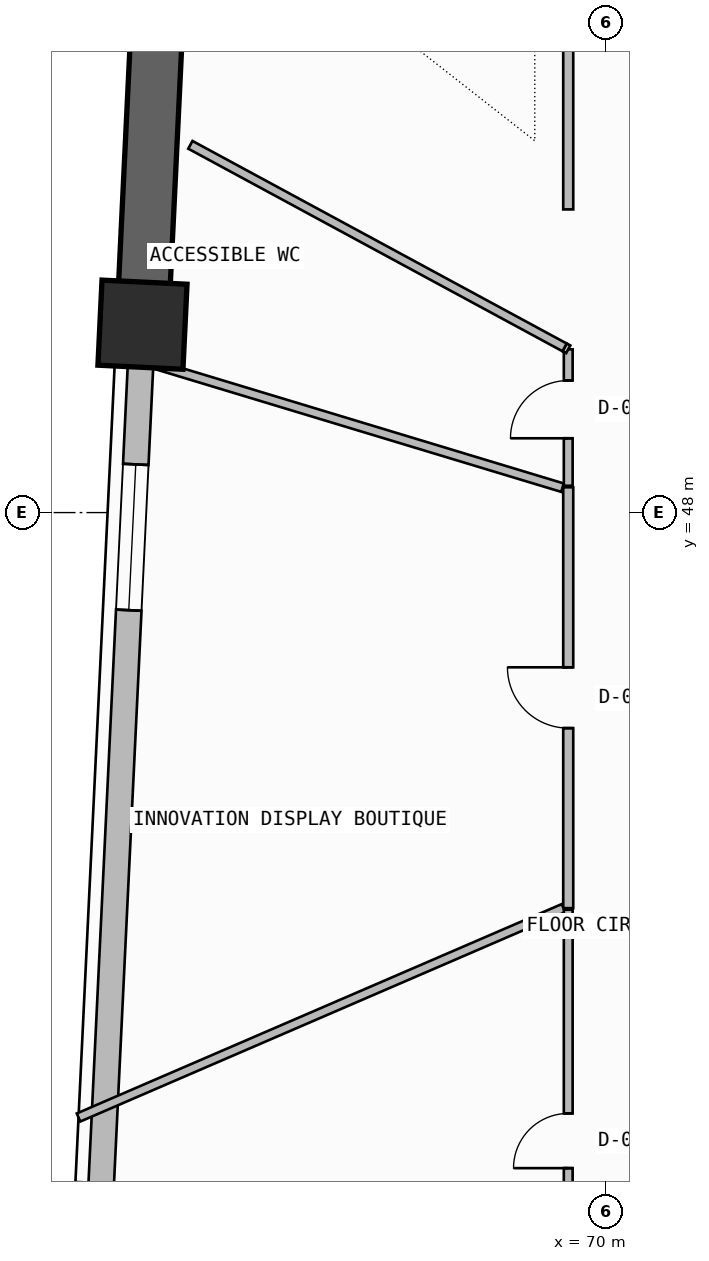
"""IFC4 building model, lengths in metres.
Left out: names, types, materials, properties, quantities, classifications, styles, units other than length and angle.
Written with IfcOpenShell. Run it as: python <this file> out.ifc"""

import sys

from ifc_helpers import new_model, si_unit, direction, frame, frame_2d, origin, origin_2d, place, context, subcontext, project, spatial, rectangle, extrude, element, fill, save


model = new_model("IFC4")
c1 = context("Model", 3, precision=1e-05, world=origin(), true_north=direction((0.0, 1.0)))
c2 = subcontext(c1, "Body", "Model", "MODEL_VIEW")
j1 = project(units=[si_unit("LENGTHUNIT", "METRE"), si_unit("PLANEANGLEUNIT", "RADIAN")], contexts=[c1])
p1 = place(None, origin())
s1 = spatial("IfcSite", under=j1, at=p1, CompositionType="ELEMENT")
p2 = place(p1, origin())
s2 = spatial("IfcBuilding", under=s1, at=p2, CompositionType="ELEMENT")
p3 = place(p2, frame((0.0, 0.0, 41.1)))
s3 = spatial("IfcBuildingStorey", under=s2, at=p3, CompositionType="ELEMENT", Elevation=41.1)
p4 = place(p3, frame((62.378, 51.09, 0.0), z_axis=(0.0, 0.0, 1.0), x_axis=(0.047978128521, 0.998848386485, 0.0)))
e1 = element("IfcColumn", 1, at=p4, inside=s3, PredefinedType="COLUMN", context=c2, shape_type="SweptSolid", body=[
    extrude(rectangle(XDim=1.4, YDim=1.4, at=origin_2d()), origin(), (0.0, 0.0, 1.0), 3.6),
])
p5 = place(p3, frame((63.428, 72.957, -0.2), z_axis=(0.0, 0.0, 1.0), x_axis=(-0.047976309476, -0.998848473858, 0.0)))
e2 = element("IfcWall", 2, at=p5, inside=s3, PredefinedType="SHEAR", context=c2, shape_type="SweptSolid", body=[
    extrude(rectangle(XDim=21.892, YDim=0.85, at=frame_2d((10.946, 0.0))), origin(), (0.0, 0.0, 1.0), 3.6),
])
p6 = place(p3, frame((62.378, 51.09, 0.0), z_axis=(0.0, 0.0, 1.0), x_axis=(-0.047978424452, -0.99884837227, 0.0)))
e3 = element("IfcWall", 3, at=p6, inside=s3, PredefinedType="SOLIDWALL", context=c2, shape_type="SweptSolid", body=[
    extrude(rectangle(XDim=14.314, YDim=0.42, at=frame_2d((7.157, 0.0))), origin(), (0.0, 0.0, 1.0), 2.385),
])
p7 = place(p6, frame((2.3, 0.0, 1.2)))
e4 = element("IfcOpeningElement", 4, at=p7, cuts=e3, PredefinedType="OPENING", context=c2, shape_type="SweptSolid", body=[
    extrude(rectangle(XDim=2.4, YDim=0.9, at=frame_2d((1.2, 0.45))), frame((0.0, 0.22, 0.0), z_axis=(0.0, -1.0, 0.0), x_axis=(1.0, 0.0, 0.0)), (0.0, 0.0, 1.0), 0.44),
])
p8 = place(p3, frame((69.38, 48.416, 0.0), z_axis=(0.0, 0.0, 1.0), x_axis=(0.0, -1.0, 0.0)))
e5 = element("IfcWall", 5, at=p8, inside=s3, PredefinedType="PARTITIONING", context=c2, shape_type="SweptSolid", body=[
    extrude(rectangle(XDim=6.921, YDim=0.165, at=frame_2d((3.46, 0.0))), origin(), (0.0, 0.0, 1.0), 3.4),
])
p9 = place(p8, frame((2.961, 0.0, 0.0)))
e6 = element("IfcOpeningElement", 6, at=p9, cuts=e5, PredefinedType="OPENING", context=c2, shape_type="SweptSolid", body=[
    extrude(rectangle(XDim=1.0, YDim=2.2, at=frame_2d((0.5, 1.1))), frame((0.0, 0.093, 0.0), z_axis=(0.0, -1.0, 0.0), x_axis=(1.0, 0.0, 0.0)), (0.0, 0.0, 1.0), 0.185),
])
p10 = place(p3, frame((69.302, 41.495, 0.0), z_axis=(0.0, 0.0, 1.0), x_axis=(-0.918109770602, -0.396326190309, 0.0)))
e7 = element("IfcWall", 7, at=p10, inside=s3, PredefinedType="PARTITIONING", context=c2, shape_type="SweptSolid", body=[
    extrude(rectangle(XDim=8.687, YDim=0.145, at=frame_2d((4.344, 0.0))), origin(), (0.0, 0.0, 1.0), 3.4),
])
p11 = place(p3, frame((61.93, 50.633, 0.0), z_axis=(0.0, 0.0, 1.0), x_axis=(0.957227800943, -0.289335336765, 0.0)))
e8 = element("IfcWall", 8, at=p11, inside=s3, PredefinedType="PARTITIONING", context=c2, shape_type="SweptSolid", body=[
    extrude(rectangle(XDim=7.684, YDim=0.145, at=frame_2d((3.842, 0.0))), origin(), (0.0, 0.0, 1.0), 3.4),
])
p12 = place(p3, frame((69.38, 41.469, 0.0), z_axis=(0.0, 0.0, 1.0), x_axis=(0.0, -1.0, 0.0)))
e9 = element("IfcWall", 9, at=p12, inside=s3, PredefinedType="PARTITIONING", context=c2, shape_type="SweptSolid", body=[
    extrude(rectangle(XDim=7.599, YDim=0.145, at=frame_2d((3.799, 0.0))), origin(), (0.0, 0.0, 1.0), 3.4),
])
p13 = place(p12, frame((3.349, 0.0, 0.0)))
e10 = element("IfcOpeningElement", 10, at=p13, cuts=e9, PredefinedType="OPENING", context=c2, shape_type="SweptSolid", body=[
    extrude(rectangle(XDim=0.9, YDim=2.1, at=frame_2d((0.45, 1.05))), frame((0.0, 0.083, 0.0), z_axis=(0.0, -1.0, 0.0), x_axis=(1.0, 0.0, 0.0)), (0.0, 0.0, 1.0), 0.165),
])
p14 = place(p3, frame((69.38, 58.926, 0.0), z_axis=(0.0, 0.0, 1.0), x_axis=(0.0, -1.0, 0.0)))
e11 = element("IfcWall", 11, at=p14, inside=s3, PredefinedType="PARTITIONING", context=c2, shape_type="SweptSolid", body=[
    extrude(rectangle(XDim=5.94, YDim=0.165, at=frame_2d((2.97, 0.0))), origin(), (0.0, 0.0, 1.0), 2.785),
])
p15 = place(p3, frame((69.38, 50.685, 0.0), z_axis=(0.0, 0.0, 1.0), x_axis=(0.0, -1.0, 0.0)))
e12 = element("IfcWall", 12, at=p15, inside=s3, PredefinedType="PARTITIONING", context=c2, shape_type="SweptSolid", body=[
    extrude(rectangle(XDim=2.243, YDim=0.145, at=frame_2d((1.122, 0.0))), origin(), (0.0, 0.0, 1.0), 3.4),
])
p16 = place(p15, frame((0.513, 0.0, 0.0)))
e13 = element("IfcOpeningElement", 13, at=p16, cuts=e12, PredefinedType="OPENING", context=c2, shape_type="SweptSolid", body=[
    extrude(rectangle(XDim=0.95, YDim=2.15, at=frame_2d((0.475, 1.075))), frame((0.0, 0.083, 0.0), z_axis=(0.0, -1.0, 0.0), x_axis=(1.0, 0.0, 0.0)), (0.0, 0.0, 1.0), 0.165),
])
p17 = place(p3, frame((69.32, 50.717, 0.0), z_axis=(0.0, 0.0, 1.0), x_axis=(0.878853431666, -0.477091862904, 0.0)))
e14 = element("IfcWall", 14, at=p17, inside=s3, PredefinedType="PARTITIONING", context=c2, shape_type="SweptSolid", body=[
    extrude(rectangle(XDim=0.068, YDim=0.145, at=frame_2d((0.034, 0.0))), origin(), (0.0, 0.0, 1.0), 3.4),
])
p18 = place(p3, frame((63.166, 54.048, 0.0), z_axis=(0.0, 0.0, 1.0), x_axis=(0.879472106789, -0.475950431641, 0.0)))
e15 = element("IfcWall", 15, at=p18, inside=s3, PredefinedType="PARTITIONING", context=c2, shape_type="SweptSolid", body=[
    extrude(rectangle(XDim=6.998, YDim=0.145, at=frame_2d((3.499, 0.0))), origin(), (0.0, 0.0, 1.0), 2.785),
])
p19 = place(p7, origin())
e16 = element("IfcWindow", 16, at=p19, inside=s3, PartitioningType="SINGLE_PANEL", PredefinedType="WINDOW", context=c2, shape_type="SweptSolid", body=[
    extrude(rectangle(XDim=2.4, YDim=0.9, at=frame_2d((1.2, 0.45))), frame((0.0, 0.03, 0.0), z_axis=(0.0, -1.0, 0.0), x_axis=(1.0, 0.0, 0.0)), (0.0, 0.0, 1.0), 0.06),
])
fill(e4, e16)
p20 = place(p9, frame((1.0, 0.0, 0.0), z_axis=(0.0, 0.0, 1.0), x_axis=(-1.0, 0.0, 0.0)))
e17 = element("IfcDoor", 17, at=p20, inside=s3, OperationType="SINGLE_SWING_RIGHT", PredefinedType="DOOR", context=c2, shape_type="SweptSolid", body=[
    extrude(rectangle(XDim=1.0, YDim=2.2, at=frame_2d((0.5, 1.1))), frame((0.0, 0.025, 0.0), z_axis=(0.0, -1.0, 0.0), x_axis=(1.0, 0.0, 0.0)), (0.0, 0.0, 1.0), 0.05),
])
fill(e6, e17)
p21 = place(p13, frame((0.9, 0.0, 0.0), z_axis=(0.0, 0.0, 1.0), x_axis=(-1.0, 0.0, 0.0)))
e18 = element("IfcDoor", 18, at=p21, inside=s3, OperationType="SINGLE_SWING_LEFT", PredefinedType="DOOR", context=c2, shape_type="SweptSolid", body=[
    extrude(rectangle(XDim=0.9, YDim=2.1, at=frame_2d((0.45, 1.05))), frame((0.0, 0.025, 0.0), z_axis=(0.0, -1.0, 0.0), x_axis=(1.0, 0.0, 0.0)), (0.0, 0.0, 1.0), 0.05),
])
fill(e10, e18)
p22 = place(p16, frame((0.95, 0.0, 0.0), z_axis=(0.0, 0.0, 1.0), x_axis=(-1.0, 0.0, 0.0)))
e19 = element("IfcDoor", 19, at=p22, inside=s3, OperationType="SINGLE_SWING_LEFT", PredefinedType="DOOR", context=c2, shape_type="SweptSolid", body=[
    extrude(rectangle(XDim=0.95, YDim=2.15, at=frame_2d((0.475, 1.075))), frame((0.0, 0.025, 0.0), z_axis=(0.0, -1.0, 0.0), x_axis=(1.0, 0.0, 0.0)), (0.0, 0.0, 1.0), 0.05),
])
fill(e13, e19)
save(model, sys.argv[1])
